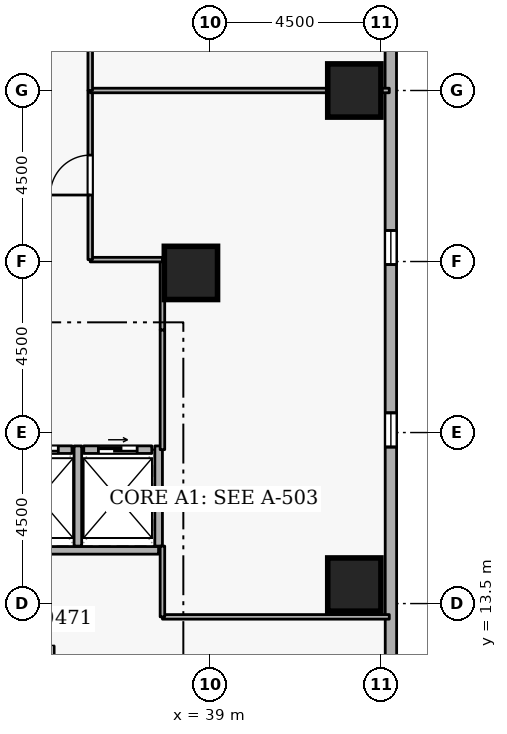
"""IFC4 building model, lengths in metres.
Left out: names, types, materials, properties, quantities, classifications, styles, units other than length and angle.
Written with IfcOpenShell. Run it as: python <this file> out.ifc"""

import sys

from ifc_helpers import new_model, si_unit, direction, frame, frame_2d, origin, origin_2d, place, context, subcontext, project, spatial, rectangle, extrude, element, fill, save


model = new_model("IFC4")
c1 = context("Model", 3, precision=1e-05, world=origin(), true_north=direction((0.0, 1.0)))
c2 = subcontext(c1, "Body", "Model", "MODEL_VIEW")
j1 = project(units=[si_unit("LENGTHUNIT", "METRE"), si_unit("PLANEANGLEUNIT", "RADIAN")], contexts=[c1])
p1 = place(None, origin())
s1 = spatial("IfcSite", under=j1, at=p1, CompositionType="ELEMENT")
p2 = place(p1, origin())
s2 = spatial("IfcBuilding", under=s1, at=p2, CompositionType="ELEMENT")
p3 = place(p2, frame((0.0, 0.0, 38.7)))
s3 = spatial("IfcBuildingStorey", under=s2, at=p3, CompositionType="ELEMENT", Elevation=38.7)
for number, where, z_axis, x_axis in (
    (1, (42.8, 14.0, 0.0), (0.0, 0.0, 1.0), (1.0, 0.0, 0.0)),
    (2, (42.8, 27.0, 0.0), (0.0, 0.0, 1.0), (1.0, 0.0, 0.0)),
    (3, (38.5, 22.2, 0.0), (0.0, 0.0, 1.0), (1.0, 0.0, 0.0)),
):
    element("IfcColumn", number, at=place(p3, frame(where, z_axis=z_axis, x_axis=x_axis)), inside=s3, PredefinedType="COLUMN", context=c2, shape_type="SweptSolid", body=[
        extrude(rectangle(XDim=1.4, YDim=1.4, at=origin_2d()), origin(), (0.0, 0.0, 1.0), 3.6),
    ])
p4 = place(p3, frame((43.765, 5.319, 0.0), z_axis=(0.0, 0.0, 1.0), x_axis=(-0.000245864205, 0.999999969775, 0.0)))
e4 = element("IfcWall", 4, at=p4, inside=s3, PredefinedType="STANDARD", context=c2, shape_type="SweptSolid", body=[
    extrude(rectangle(XDim=34.755, YDim=0.3, at=frame_2d((17.377, 0.0))), origin(), (0.0, 0.0, 1.0), 2.7),
])
p5 = place(p4, frame((2.7, 0.0, 0.72)))
e5 = element("IfcOpeningElement", 5, at=p5, cuts=e4, PredefinedType="OPENING", context=c2, shape_type="SweptSolid", body=[
    extrude(rectangle(XDim=0.9, YDim=1.75, at=frame_2d((0.45, 0.875))), frame((0.0, 0.16, 0.0), z_axis=(0.0, -1.0, 0.0), x_axis=(1.0, 0.0, 0.0)), (0.0, 0.0, 1.0), 0.32),
])
p6 = place(p4, frame((12.3, 0.0, 0.72)))
e6 = element("IfcOpeningElement", 6, at=p6, cuts=e4, PredefinedType="OPENING", context=c2, shape_type="SweptSolid", body=[
    extrude(rectangle(XDim=0.9, YDim=1.75, at=frame_2d((0.45, 0.875))), frame((0.0, 0.16, 0.0), z_axis=(0.0, -1.0, 0.0), x_axis=(1.0, 0.0, 0.0)), (0.0, 0.0, 1.0), 0.32),
])
p7 = place(p4, frame((17.1, 0.0, 0.72)))
e7 = element("IfcOpeningElement", 7, at=p7, cuts=e4, PredefinedType="OPENING", context=c2, shape_type="SweptSolid", body=[
    extrude(rectangle(XDim=0.9, YDim=1.75, at=frame_2d((0.45, 0.875))), frame((0.0, 0.16, 0.0), z_axis=(0.0, -1.0, 0.0), x_axis=(1.0, 0.0, 0.0)), (0.0, 0.0, 1.0), 0.32),
])
p8 = place(p4, frame((26.7, 0.0, 0.72)))
e8 = element("IfcOpeningElement", 8, at=p8, cuts=e4, PredefinedType="OPENING", context=c2, shape_type="SweptSolid", body=[
    extrude(rectangle(XDim=0.9, YDim=1.75, at=frame_2d((0.45, 0.875))), frame((0.0, 0.16, 0.0), z_axis=(0.0, -1.0, 0.0), x_axis=(1.0, 0.0, 0.0)), (0.0, 0.0, 1.0), 0.32),
])
p9 = place(p4, frame((31.5, 0.0, 0.72)))
e9 = element("IfcOpeningElement", 9, at=p9, cuts=e4, PredefinedType="OPENING", context=c2, shape_type="SweptSolid", body=[
    extrude(rectangle(XDim=0.9, YDim=1.75, at=frame_2d((0.45, 0.875))), frame((0.0, 0.16, 0.0), z_axis=(0.0, -1.0, 0.0), x_axis=(1.0, 0.0, 0.0)), (0.0, 0.0, 1.0), 0.32),
])
p10 = place(p3, frame((33.63, 17.55, 0.0), z_axis=(0.0, 0.0, 1.0), x_axis=(1.0, 0.0, 0.0)))
e10 = element("IfcWall", 10, at=p10, inside=s3, PredefinedType="STANDARD", context=c2, shape_type="SweptSolid", body=[
    extrude(rectangle(XDim=1.74, YDim=0.2, at=frame_2d((0.87, 0.0))), origin(), (0.0, 0.0, 1.0), 3.34),
])
p11 = place(p10, frame((0.36, 0.0, 0.0)))
e11 = element("IfcOpeningElement", 11, at=p11, cuts=e10, PredefinedType="OPENING", context=c2, shape_type="SweptSolid", body=[
    extrude(rectangle(XDim=1.02, YDim=2.06, at=frame_2d((0.51, 1.03))), frame((0.0, 0.11, 0.0), z_axis=(0.0, -1.0, 0.0), x_axis=(1.0, 0.0, 0.0)), (0.0, 0.0, 1.0), 0.22),
])
p12 = place(p3, frame((35.68, 17.55, 0.0), z_axis=(0.0, 0.0, 1.0), x_axis=(1.0, 0.0, 0.0)))
e12 = element("IfcWall", 12, at=p12, inside=s3, PredefinedType="STANDARD", context=c2, shape_type="SweptSolid", body=[
    extrude(rectangle(XDim=1.79, YDim=0.2, at=frame_2d((0.895, 0.0))), origin(), (0.0, 0.0, 1.0), 3.34),
])
p13 = place(p12, frame((0.385, 0.0, 0.0)))
e13 = element("IfcOpeningElement", 13, at=p13, cuts=e12, PredefinedType="OPENING", context=c2, shape_type="SweptSolid", body=[
    extrude(rectangle(XDim=1.02, YDim=2.06, at=frame_2d((0.51, 1.03))), frame((0.0, 0.11, 0.0), z_axis=(0.0, -1.0, 0.0), x_axis=(1.0, 0.0, 0.0)), (0.0, 0.0, 1.0), 0.22),
])
p14 = place(p3, frame((33.452, 14.9, 0.0), z_axis=(0.0, 0.0, 1.0), x_axis=(1.0, 0.0, 0.0)))
e14 = element("IfcWall", 14, at=p14, inside=s3, PredefinedType="STANDARD", context=c2, shape_type="SweptSolid", body=[
    extrude(rectangle(XDim=4.196, YDim=0.2, at=frame_2d((2.098, 0.0))), origin(), (0.0, 0.0, 1.0), 3.34),
])
for number, where, z_axis, x_axis in (
    (15, (35.525, 15.012, 0.0), (0.0, 0.0, 1.0), (0.0, 1.0, 0.0)),
    (16, (37.65, 15.012, 0.0), (0.0, 0.0, 1.0), (0.0, 1.0, 0.0)),
):
    element("IfcWall", number, at=place(p3, frame(where, z_axis=z_axis, x_axis=x_axis)), inside=s3, PredefinedType="STANDARD", context=c2, shape_type="SweptSolid", body=[
        extrude(rectangle(XDim=2.636, YDim=0.2, at=frame_2d((1.318, 0.0))), origin(), (0.0, 0.0, 1.0), 3.34),
    ])
p15 = place(p3, frame((37.75, 17.55, 0.0), z_axis=(0.0, 0.0, 1.0), x_axis=(0.0, 1.0, 0.0)))
e17 = element("IfcWall", 17, at=p15, inside=s3, PredefinedType="PARTITIONING", context=c2, shape_type="SweptSolid", body=[
    extrude(rectangle(XDim=3.15, YDim=0.12, at=frame_2d((1.575, 0.0))), origin(), (0.0, 0.0, 1.0), 3.34),
])
p16 = place(p3, frame((37.75, 20.7, 0.0), z_axis=(0.0, 0.0, 1.0), x_axis=(0.0, 1.0, 0.0)))
e18 = element("IfcWall", 18, at=p16, inside=s3, PredefinedType="PARTITIONING", context=c2, shape_type="SweptSolid", body=[
    extrude(rectangle(XDim=1.85, YDim=0.12, at=frame_2d((0.925, 0.0))), origin(), (0.0, 0.0, 1.0), 3.34),
])
p17 = place(p3, frame((37.75, 22.55, 0.0), z_axis=(0.0, 0.0, 1.0), x_axis=(-1.0, 0.0, 0.0)))
e19 = element("IfcWall", 19, at=p17, inside=s3, PredefinedType="PARTITIONING", context=c2, shape_type="SweptSolid", body=[
    extrude(rectangle(XDim=1.9, YDim=0.12, at=frame_2d((0.95, 0.0))), origin(), (0.0, 0.0, 1.0), 3.34),
])
p18 = place(p3, frame((35.85, 22.55, 0.0), z_axis=(0.0, 0.0, 1.0), x_axis=(0.0, 1.0, 0.0)))
e20 = element("IfcWall", 20, at=p18, inside=s3, PredefinedType="PARTITIONING", context=c2, shape_type="SweptSolid", body=[
    extrude(rectangle(XDim=4.45, YDim=0.12, at=frame_2d((2.225, 0.0))), origin(), (0.0, 0.0, 1.0), 3.34),
])
p19 = place(p18, frame((1.7, 0.0, 0.0)))
e21 = element("IfcOpeningElement", 21, at=p19, cuts=e20, PredefinedType="OPENING", context=c2, shape_type="SweptSolid", body=[
    extrude(rectangle(XDim=1.05, YDim=2.1, at=frame_2d((0.525, 1.05))), frame((0.0, 0.07, 0.0), z_axis=(0.0, -1.0, 0.0), x_axis=(1.0, 0.0, 0.0)), (0.0, 0.0, 1.0), 0.14),
])
p20 = place(p3, frame((35.85, 27.0, 0.0), z_axis=(0.0, 0.0, 1.0), x_axis=(1.0, 0.0, 0.0)))
e22 = element("IfcWall", 22, at=p20, inside=s3, PredefinedType="PARTITIONING", context=c2, shape_type="SweptSolid", body=[
    extrude(rectangle(XDim=7.87, YDim=0.12, at=frame_2d((3.935, 0.0))), origin(), (0.0, 0.0, 1.0), 2.882),
])
p21 = place(p3, frame((43.72, 13.15, 0.0), z_axis=(0.0, 0.0, 1.0), x_axis=(-1.0, 0.0, 0.0)))
e23 = element("IfcWall", 23, at=p21, inside=s3, PredefinedType="PARTITIONING", context=c2, shape_type="SweptSolid", body=[
    extrude(rectangle(XDim=5.97, YDim=0.12, at=frame_2d((2.985, 0.0))), origin(), (0.0, 0.0, 1.0), 3.34),
])
p22 = place(p3, frame((37.75, 13.15, 0.0), z_axis=(0.0, 0.0, 1.0), x_axis=(0.0, 1.0, 0.0)))
e24 = element("IfcWall", 24, at=p22, inside=s3, PredefinedType="PARTITIONING", context=c2, shape_type="SweptSolid", body=[
    extrude(rectangle(XDim=1.862, YDim=0.12, at=frame_2d((0.931, 0.0))), origin(), (0.0, 0.0, 1.0), 3.34),
])
p23 = place(p3, frame((35.85, 27.0, 0.0), z_axis=(0.0, 0.0, 1.0), x_axis=(0.0, 1.0, 0.0)))
e25 = element("IfcWall", 25, at=p23, inside=s3, PredefinedType="PARTITIONING", context=c2, shape_type="SweptSolid", body=[
    extrude(rectangle(XDim=3.15, YDim=0.12, at=frame_2d((1.575, 0.0))), origin(), (0.0, 0.0, 1.0), 3.34),
])
p24 = place(p23, frame((1.1, 0.0, 0.0)))
e26 = element("IfcOpeningElement", 26, at=p24, cuts=e25, PredefinedType="OPENING", context=c2, shape_type="SweptSolid", body=[
    extrude(rectangle(XDim=0.95, YDim=2.1, at=frame_2d((0.475, 1.05))), frame((0.0, 0.07, 0.0), z_axis=(0.0, -1.0, 0.0), x_axis=(1.0, 0.0, 0.0)), (0.0, 0.0, 1.0), 0.14),
])
p25 = place(p6, origin())
e27 = element("IfcWindow", 27, at=p25, inside=s3, PartitioningType="SINGLE_PANEL", PredefinedType="WINDOW", context=c2, shape_type="SweptSolid", body=[
    extrude(rectangle(XDim=0.9, YDim=1.75, at=frame_2d((0.45, 0.875))), frame((0.0, 0.03, 0.0), z_axis=(0.0, -1.0, 0.0), x_axis=(1.0, 0.0, 0.0)), (0.0, 0.0, 1.0), 0.06),
])
fill(e6, e27)
p26 = place(p7, origin())
e28 = element("IfcWindow", 28, at=p26, inside=s3, PartitioningType="SINGLE_PANEL", PredefinedType="WINDOW", context=c2, shape_type="SweptSolid", body=[
    extrude(rectangle(XDim=0.9, YDim=1.75, at=frame_2d((0.45, 0.875))), frame((0.0, 0.03, 0.0), z_axis=(0.0, -1.0, 0.0), x_axis=(1.0, 0.0, 0.0)), (0.0, 0.0, 1.0), 0.06),
])
fill(e7, e28)
p27 = place(p11, origin())
e29 = element("IfcDoor", 29, at=p27, inside=s3, OperationType="SLIDING_TO_LEFT", PredefinedType="DOOR", context=c2, shape_type="SweptSolid", body=[
    extrude(rectangle(XDim=1.02, YDim=2.06, at=frame_2d((0.51, 1.03))), frame((0.0, 0.025, 0.0), z_axis=(0.0, -1.0, 0.0), x_axis=(1.0, 0.0, 0.0)), (0.0, 0.0, 1.0), 0.05),
])
fill(e11, e29)
p28 = place(p13, origin())
e30 = element("IfcDoor", 30, at=p28, inside=s3, OperationType="SLIDING_TO_LEFT", PredefinedType="DOOR", context=c2, shape_type="SweptSolid", body=[
    extrude(rectangle(XDim=1.02, YDim=2.06, at=frame_2d((0.51, 1.03))), frame((0.0, 0.025, 0.0), z_axis=(0.0, -1.0, 0.0), x_axis=(1.0, 0.0, 0.0)), (0.0, 0.0, 1.0), 0.05),
])
fill(e13, e30)
p29 = place(p19, origin())
e31 = element("IfcDoor", 31, at=p29, inside=s3, OperationType="SINGLE_SWING_LEFT", PredefinedType="DOOR", context=c2, shape_type="SweptSolid", body=[
    extrude(rectangle(XDim=1.05, YDim=2.1, at=frame_2d((0.525, 1.05))), frame((0.0, 0.025, 0.0), z_axis=(0.0, -1.0, 0.0), x_axis=(1.0, 0.0, 0.0)), (0.0, 0.0, 1.0), 0.05),
])
fill(e21, e31)
save(model, sys.argv[1])
